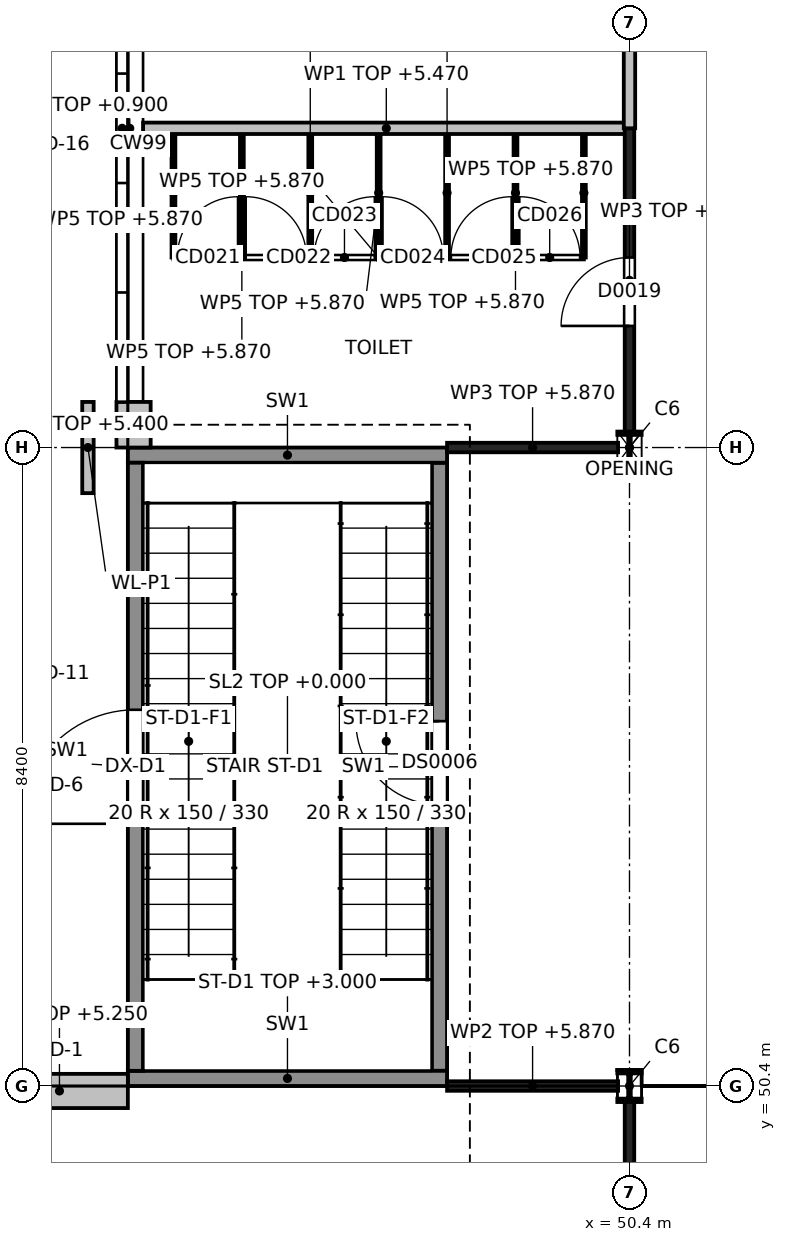
"""IFC4 building model, lengths in metres.
Left out: names, types, materials, properties, quantities, classifications, styles, units other than length and angle.
Written with IfcOpenShell. Run it as: python <this file> out.ifc"""

import sys

from ifc_helpers import new_model, si_unit, direction, frame, frame_2d, origin, origin_2d, place, context, subcontext, project, spatial, rectangle, i_section, extrude, element, fill, save


model = new_model("IFC4")
c1 = context("Model", 3, precision=1e-05, world=origin(), true_north=direction((0.0, 1.0)))
c2 = subcontext(c1, "Body", "Model", "MODEL_VIEW")
j1 = project(units=[si_unit("LENGTHUNIT", "METRE"), si_unit("PLANEANGLEUNIT", "RADIAN")], contexts=[c1])
p1 = place(None, origin())
s1 = spatial("IfcSite", under=j1, at=p1, CompositionType="ELEMENT")
p2 = place(p1, origin())
s2 = spatial("IfcBuilding", under=s1, at=p2, CompositionType="ELEMENT")
p3 = place(p2, origin())
s3 = spatial("IfcBuildingStorey", under=s2, at=p3, CompositionType="ELEMENT", Elevation=0.0)
for number, where, z_axis, x_axis in (
    (1, (50.4, 50.4, -1.35), (0.0, 0.0, 1.0), (1.0, 0.0, 0.0)),
    (2, (50.4, 58.8, -1.35), (0.0, 0.0, 1.0), (1.0, 0.0, 0.0)),
):
    element("IfcColumn", number, at=place(p3, frame(where, z_axis=z_axis, x_axis=x_axis)), inside=s3, PredefinedType="COLUMN", context=c2, shape_type="SweptSolid", body=[
        extrude(i_section(OverallWidth=0.3, OverallDepth=0.4, WebThickness=0.013, FlangeThickness=0.024, at=origin_2d()), origin(), (0.0, 0.0, 1.0), 7.35),
    ])
for number, where, z_axis, x_axis in (
    (3, (43.8, 50.5, -1.35), (0.0, 0.0, 1.0), (1.0, 0.0, 0.0)),
    (4, (43.8, 58.7, -1.35), (0.0, 0.0, 1.0), (1.0, 0.0, 0.0)),
):
    element("IfcWall", number, at=place(p3, frame(where, z_axis=z_axis, x_axis=x_axis)), inside=s3, PredefinedType="SHEAR", context=c2, shape_type="SweptSolid", body=[
        extrude(rectangle(XDim=4.2, YDim=0.2, at=frame_2d((2.1, 0.0))), origin(), (0.0, 0.0, 1.0), 7.35),
    ])
p4 = place(p3, frame((43.9, 50.6, -1.35), z_axis=(0.0, 0.0, 1.0), x_axis=(0.0, 1.0, 0.0)))
e5 = element("IfcWall", 5, at=p4, inside=s3, PredefinedType="SHEAR", context=c2, shape_type="SweptSolid", body=[
    extrude(rectangle(XDim=8.0, YDim=0.2, at=frame_2d((4.0, 0.0))), origin(), (0.0, 0.0, 1.0), 7.35),
])
p5 = place(p4, frame((3.25, 0.0, 1.35)))
e6 = element("IfcOpeningElement", 6, at=p5, cuts=e5, PredefinedType="OPENING", context=c2, shape_type="SweptSolid", body=[
    extrude(rectangle(XDim=1.5, YDim=2.4, at=frame_2d((0.75, 1.2))), frame((0.0, 0.1, 0.0), z_axis=(0.0, -1.0, 0.0), x_axis=(1.0, 0.0, 0.0)), (0.0, 0.0, 1.0), 0.2),
])
p6 = place(p3, frame((47.9, 50.6, -1.35), z_axis=(0.0, 0.0, 1.0), x_axis=(0.0, 1.0, 0.0)))
e7 = element("IfcWall", 7, at=p6, inside=s3, PredefinedType="SHEAR", context=c2, shape_type="SweptSolid", body=[
    extrude(rectangle(XDim=8.0, YDim=0.2, at=frame_2d((4.0, 0.0))), origin(), (0.0, 0.0, 1.0), 7.35),
])
p7 = place(p6, frame((3.5, 0.0, 1.35)))
e8 = element("IfcOpeningElement", 8, at=p7, cuts=e7, PredefinedType="OPENING", context=c2, shape_type="SweptSolid", body=[
    extrude(rectangle(XDim=1.1, YDim=2.1, at=frame_2d((0.55, 1.05))), frame((0.0, 0.1, 0.0), z_axis=(0.0, -1.0, 0.0), x_axis=(1.0, 0.0, 0.0)), (0.0, 0.0, 1.0), 0.2),
])
p8 = place(p3, frame((42.0, 50.335, 0.0), z_axis=(0.0, 0.0, 1.0), x_axis=(1.0, 0.0, 0.0)))
e9 = element("IfcWall", 9, at=p8, inside=s3, PredefinedType="SOLIDWALL", context=c2, shape_type="SweptSolid", body=[
    extrude(rectangle(XDim=1.8, YDim=0.45, at=frame_2d((0.9, 0.0))), origin(), (0.0, 0.0, 1.0), 5.25),
])
p9 = place(p3, frame((43.825, 59.4, 0.0), z_axis=(0.0, 0.0, 1.0), x_axis=(0.0, 1.0, 0.0)))
e10 = element("IfcWall", 10, at=p9, inside=s3, PredefinedType="SOLIDWALL", context=c2, shape_type="SweptSolid", body=[
    extrude(rectangle(XDim=7.2, YDim=0.35, at=frame_2d((3.6, 0.0))), origin(), (0.0, 0.0, 1.0), 0.9),
])
p10 = place(p3, frame((43.875, 58.8, 0.0), z_axis=(0.0, 0.0, 1.0), x_axis=(0.0, 1.0, 0.0)))
e11 = element("IfcWall", 11, at=p10, inside=s3, PredefinedType="SOLIDWALL", context=c2, shape_type="SweptSolid", body=[
    extrude(rectangle(XDim=0.6, YDim=0.45, at=frame_2d((0.3, 0.0))), origin(), (0.0, 0.0, 1.0), 5.4),
])
p11 = place(p3, frame((43.275, 58.2, 0.0), z_axis=(0.0, 0.0, 1.0), x_axis=(0.0, 1.0, 0.0)))
e12 = element("IfcWall", 12, at=p11, inside=s3, PredefinedType="SOLIDWALL", context=c2, shape_type="SweptSolid", body=[
    extrude(rectangle(XDim=1.2, YDim=0.15, at=frame_2d((0.6, 0.0))), origin(), (0.0, 0.0, 1.0), 6.0),
])
p12 = place(p3, frame((50.4, 42.15, 0.0), z_axis=(0.0, 0.0, 1.0), x_axis=(0.0, 1.0, 0.0)))
e13 = element("IfcWall", 13, at=p12, inside=s3, PredefinedType="PARTITIONING", context=c2, shape_type="SweptSolid", body=[
    extrude(rectangle(XDim=8.05, YDim=0.125, at=frame_2d((4.025, 0.0))), origin(), (0.0, 0.0, 1.0), 5.48),
])
for number, where, z_axis, x_axis in (
    (14, (48.0, 50.4, 0.0), (0.0, 0.0, 1.0), (1.0, 0.0, 0.0)),
    (15, (48.0, 58.8, 0.0), (0.0, 0.0, 1.0), (1.0, 0.0, 0.0)),
):
    element("IfcWall", number, at=place(p3, frame(where, z_axis=z_axis, x_axis=x_axis)), inside=s3, PredefinedType="PARTITIONING", context=c2, shape_type="SweptSolid", body=[
        extrude(rectangle(XDim=2.25, YDim=0.125, at=frame_2d((1.125, 0.0))), origin(), (0.0, 0.0, 1.0), 5.87),
    ])
p13 = place(p3, frame((44.0, 63.0, 0.0), z_axis=(0.0, 0.0, 1.0), x_axis=(1.0, 0.0, 0.0)))
e16 = element("IfcWall", 16, at=p13, inside=s3, PredefinedType="PARTITIONING", context=c2, shape_type="SweptSolid", body=[
    extrude(rectangle(XDim=6.399, YDim=0.15, at=frame_2d((3.2, 0.0))), origin(), (0.0, 0.0, 1.0), 5.47),
])
p14 = place(p3, frame((50.4, 59.0, 0.0), z_axis=(0.0, 0.0, 1.0), x_axis=(0.0, 1.0, 0.0)))
e17 = element("IfcWall", 17, at=p14, inside=s3, PredefinedType="PARTITIONING", context=c2, shape_type="SweptSolid", body=[
    extrude(rectangle(XDim=4.0, YDim=0.125, at=frame_2d((2.0, 0.0))), origin(), (0.0, 0.0, 1.0), 5.47),
])
p15 = place(p14, frame((1.4, 0.0, 0.0)))
e18 = element("IfcOpeningElement", 18, at=p15, cuts=e17, PredefinedType="OPENING", context=c2, shape_type="SweptSolid", body=[
    extrude(rectangle(XDim=0.9, YDim=2.1, at=frame_2d((0.45, 1.05))), frame((0.0, 0.062, 0.0), z_axis=(0.0, -1.0, 0.0), x_axis=(1.0, 0.0, 0.0)), (0.0, 0.0, 1.0), 0.125),
])
p16 = place(p3, frame((50.4, 63.0, 0.0), z_axis=(0.0, 0.0, 1.0), x_axis=(0.0, 1.0, 0.0)))
e19 = element("IfcWall", 19, at=p16, inside=s3, PredefinedType="PARTITIONING", context=c2, shape_type="SweptSolid", body=[
    extrude(rectangle(XDim=4.055, YDim=0.15, at=frame_2d((2.027, 0.0))), origin(), (0.0, 0.0, 1.0), 5.47),
])
p17 = place(p16, frame((2.95, 0.0, 0.0)))
e20 = element("IfcOpeningElement", 20, at=p17, cuts=e19, PredefinedType="OPENING", context=c2, shape_type="SweptSolid", body=[
    extrude(rectangle(XDim=0.9, YDim=2.1, at=frame_2d((0.45, 1.05))), frame((0.0, 0.075, 0.0), z_axis=(0.0, -1.0, 0.0), x_axis=(1.0, 0.0, 0.0)), (0.0, 0.0, 1.0), 0.15),
])
p18 = place(p3, frame((44.4, 61.3, 0.0), z_axis=(0.0, 0.0, 1.0), x_axis=(1.0, 0.0, 0.0)))
e21 = element("IfcWall", 21, at=p18, inside=s3, PredefinedType="PARTITIONING", context=c2, shape_type="SweptSolid", body=[
    extrude(rectangle(XDim=5.4, YDim=0.05, at=frame_2d((2.7, 0.0))), origin(), (0.0, 0.0, 1.0), 5.87),
])
p19 = place(p18, frame((0.05, 0.0, 0.0)))
e22 = element("IfcOpeningElement", 22, at=p19, cuts=e21, PredefinedType="OPENING", context=c2, shape_type="SweptSolid", body=[
    extrude(rectangle(XDim=0.8, YDim=2.0, at=frame_2d((0.4, 1.0))), frame((0.0, 0.025, 0.0), z_axis=(0.0, -1.0, 0.0), x_axis=(1.0, 0.0, 0.0)), (0.0, 0.0, 1.0), 0.05),
])
p20 = place(p18, frame((0.95, 0.0, 0.0)))
e23 = element("IfcOpeningElement", 23, at=p20, cuts=e21, PredefinedType="OPENING", context=c2, shape_type="SweptSolid", body=[
    extrude(rectangle(XDim=0.8, YDim=2.0, at=frame_2d((0.4, 1.0))), frame((0.0, 0.025, 0.0), z_axis=(0.0, -1.0, 0.0), x_axis=(1.0, 0.0, 0.0)), (0.0, 0.0, 1.0), 0.05),
])
p21 = place(p18, frame((1.85, 0.0, 0.0)))
e24 = element("IfcOpeningElement", 24, at=p21, cuts=e21, PredefinedType="OPENING", context=c2, shape_type="SweptSolid", body=[
    extrude(rectangle(XDim=0.8, YDim=2.0, at=frame_2d((0.4, 1.0))), frame((0.0, 0.025, 0.0), z_axis=(0.0, -1.0, 0.0), x_axis=(1.0, 0.0, 0.0)), (0.0, 0.0, 1.0), 0.05),
])
p22 = place(p18, frame((2.75, 0.0, 0.0)))
e25 = element("IfcOpeningElement", 25, at=p22, cuts=e21, PredefinedType="OPENING", context=c2, shape_type="SweptSolid", body=[
    extrude(rectangle(XDim=0.8, YDim=2.0, at=frame_2d((0.4, 1.0))), frame((0.0, 0.025, 0.0), z_axis=(0.0, -1.0, 0.0), x_axis=(1.0, 0.0, 0.0)), (0.0, 0.0, 1.0), 0.05),
])
p23 = place(p18, frame((3.65, 0.0, 0.0)))
e26 = element("IfcOpeningElement", 26, at=p23, cuts=e21, PredefinedType="OPENING", context=c2, shape_type="SweptSolid", body=[
    extrude(rectangle(XDim=0.8, YDim=2.0, at=frame_2d((0.4, 1.0))), frame((0.0, 0.025, 0.0), z_axis=(0.0, -1.0, 0.0), x_axis=(1.0, 0.0, 0.0)), (0.0, 0.0, 1.0), 0.05),
])
p24 = place(p18, frame((4.55, 0.0, 0.0)))
e27 = element("IfcOpeningElement", 27, at=p24, cuts=e21, PredefinedType="OPENING", context=c2, shape_type="SweptSolid", body=[
    extrude(rectangle(XDim=0.8, YDim=2.0, at=frame_2d((0.4, 1.0))), frame((0.0, 0.025, 0.0), z_axis=(0.0, -1.0, 0.0), x_axis=(1.0, 0.0, 0.0)), (0.0, 0.0, 1.0), 0.05),
])
for number, where, z_axis, x_axis in (
    (28, (44.4, 63.0, 0.0), (0.0, 0.0, 1.0), (0.0, -1.0, 0.0)),
    (29, (45.3, 63.0, 0.0), (0.0, 0.0, 1.0), (0.0, -1.0, 0.0)),
    (30, (46.2, 63.0, 0.0), (0.0, 0.0, 1.0), (0.0, -1.0, 0.0)),
    (31, (47.1, 63.0, 0.0), (0.0, 0.0, 1.0), (0.0, -1.0, 0.0)),
    (32, (48.0, 63.0, 0.0), (0.0, 0.0, 1.0), (0.0, -1.0, 0.0)),
    (33, (48.9, 63.0, 0.0), (0.0, 0.0, 1.0), (0.0, -1.0, 0.0)),
    (34, (49.8, 63.0, 0.0), (0.0, 0.0, 1.0), (0.0, -1.0, 0.0)),
):
    element("IfcWall", number, at=place(p3, frame(where, z_axis=z_axis, x_axis=x_axis)), inside=s3, PredefinedType="PARTITIONING", context=c2, shape_type="SweptSolid", body=[
        extrude(rectangle(XDim=1.7, YDim=0.05, at=frame_2d((0.85, 0.0))), origin(), (0.0, 0.0, 1.0), 5.87),
    ])
p25 = place(p5, origin())
e35 = element("IfcDoor", 35, at=p25, inside=s3, OperationType="DOUBLE_DOOR_SINGLE_SWING", PredefinedType="DOOR", context=c2, shape_type="SweptSolid", body=[
    extrude(rectangle(XDim=1.5, YDim=2.4, at=frame_2d((0.75, 1.2))), frame((0.0, 0.025, 0.0), z_axis=(0.0, -1.0, 0.0), x_axis=(1.0, 0.0, 0.0)), (0.0, 0.0, 1.0), 0.05),
])
fill(e6, e35)
p26 = place(p15, origin())
e36 = element("IfcDoor", 36, at=p26, inside=s3, OperationType="SINGLE_SWING_LEFT", PredefinedType="DOOR", context=c2, shape_type="SweptSolid", body=[
    extrude(rectangle(XDim=0.9, YDim=2.1, at=frame_2d((0.45, 1.05))), frame((0.0, 0.025, 0.0), z_axis=(0.0, -1.0, 0.0), x_axis=(1.0, 0.0, 0.0)), (0.0, 0.0, 1.0), 0.05),
])
fill(e18, e36)
p27 = place(p7, frame((1.1, 0.05, 0.0), z_axis=(0.0, 0.0, 1.0), x_axis=(-1.0, 0.0, 0.0)))
e37 = element("IfcDoor", 37, at=p27, inside=s3, OperationType="SINGLE_SWING_RIGHT", PredefinedType="DOOR", context=c2, shape_type="SweptSolid", body=[
    extrude(rectangle(XDim=1.1, YDim=2.1, at=frame_2d((0.55, 1.05))), frame((0.0, 0.025, 0.0), z_axis=(0.0, -1.0, 0.0), x_axis=(1.0, 0.0, 0.0)), (0.0, 0.0, 1.0), 0.05),
])
fill(e8, e37)
p28 = place(p19, origin())
e38 = element("IfcDoor", 38, at=p28, inside=s3, OperationType="SINGLE_SWING_RIGHT", PredefinedType="DOOR", context=c2, shape_type="SweptSolid", body=[
    extrude(rectangle(XDim=0.8, YDim=2.0, at=frame_2d((0.4, 1.0))), frame((0.0, 0.025, 0.0), z_axis=(0.0, -1.0, 0.0), x_axis=(1.0, 0.0, 0.0)), (0.0, 0.0, 1.0), 0.05),
])
fill(e22, e38)
p29 = place(p20, origin())
e39 = element("IfcDoor", 39, at=p29, inside=s3, OperationType="SINGLE_SWING_LEFT", PredefinedType="DOOR", context=c2, shape_type="SweptSolid", body=[
    extrude(rectangle(XDim=0.8, YDim=2.0, at=frame_2d((0.4, 1.0))), frame((0.0, 0.025, 0.0), z_axis=(0.0, -1.0, 0.0), x_axis=(1.0, 0.0, 0.0)), (0.0, 0.0, 1.0), 0.05),
])
fill(e23, e39)
p30 = place(p21, origin())
e40 = element("IfcDoor", 40, at=p30, inside=s3, OperationType="SINGLE_SWING_RIGHT", PredefinedType="DOOR", context=c2, shape_type="SweptSolid", body=[
    extrude(rectangle(XDim=0.8, YDim=2.0, at=frame_2d((0.4, 1.0))), frame((0.0, 0.025, 0.0), z_axis=(0.0, -1.0, 0.0), x_axis=(1.0, 0.0, 0.0)), (0.0, 0.0, 1.0), 0.05),
])
fill(e24, e40)
p31 = place(p22, origin())
e41 = element("IfcDoor", 41, at=p31, inside=s3, OperationType="SINGLE_SWING_LEFT", PredefinedType="DOOR", context=c2, shape_type="SweptSolid", body=[
    extrude(rectangle(XDim=0.8, YDim=2.0, at=frame_2d((0.4, 1.0))), frame((0.0, 0.025, 0.0), z_axis=(0.0, -1.0, 0.0), x_axis=(1.0, 0.0, 0.0)), (0.0, 0.0, 1.0), 0.05),
])
fill(e25, e41)
p32 = place(p23, origin())
e42 = element("IfcDoor", 42, at=p32, inside=s3, OperationType="SINGLE_SWING_RIGHT", PredefinedType="DOOR", context=c2, shape_type="SweptSolid", body=[
    extrude(rectangle(XDim=0.8, YDim=2.0, at=frame_2d((0.4, 1.0))), frame((0.0, 0.025, 0.0), z_axis=(0.0, -1.0, 0.0), x_axis=(1.0, 0.0, 0.0)), (0.0, 0.0, 1.0), 0.05),
])
fill(e26, e42)
p33 = place(p24, origin())
e43 = element("IfcDoor", 43, at=p33, inside=s3, OperationType="SINGLE_SWING_LEFT", PredefinedType="DOOR", context=c2, shape_type="SweptSolid", body=[
    extrude(rectangle(XDim=0.8, YDim=2.0, at=frame_2d((0.4, 1.0))), frame((0.0, 0.025, 0.0), z_axis=(0.0, -1.0, 0.0), x_axis=(1.0, 0.0, 0.0)), (0.0, 0.0, 1.0), 0.05),
])
fill(e27, e43)
save(model, sys.argv[1])
